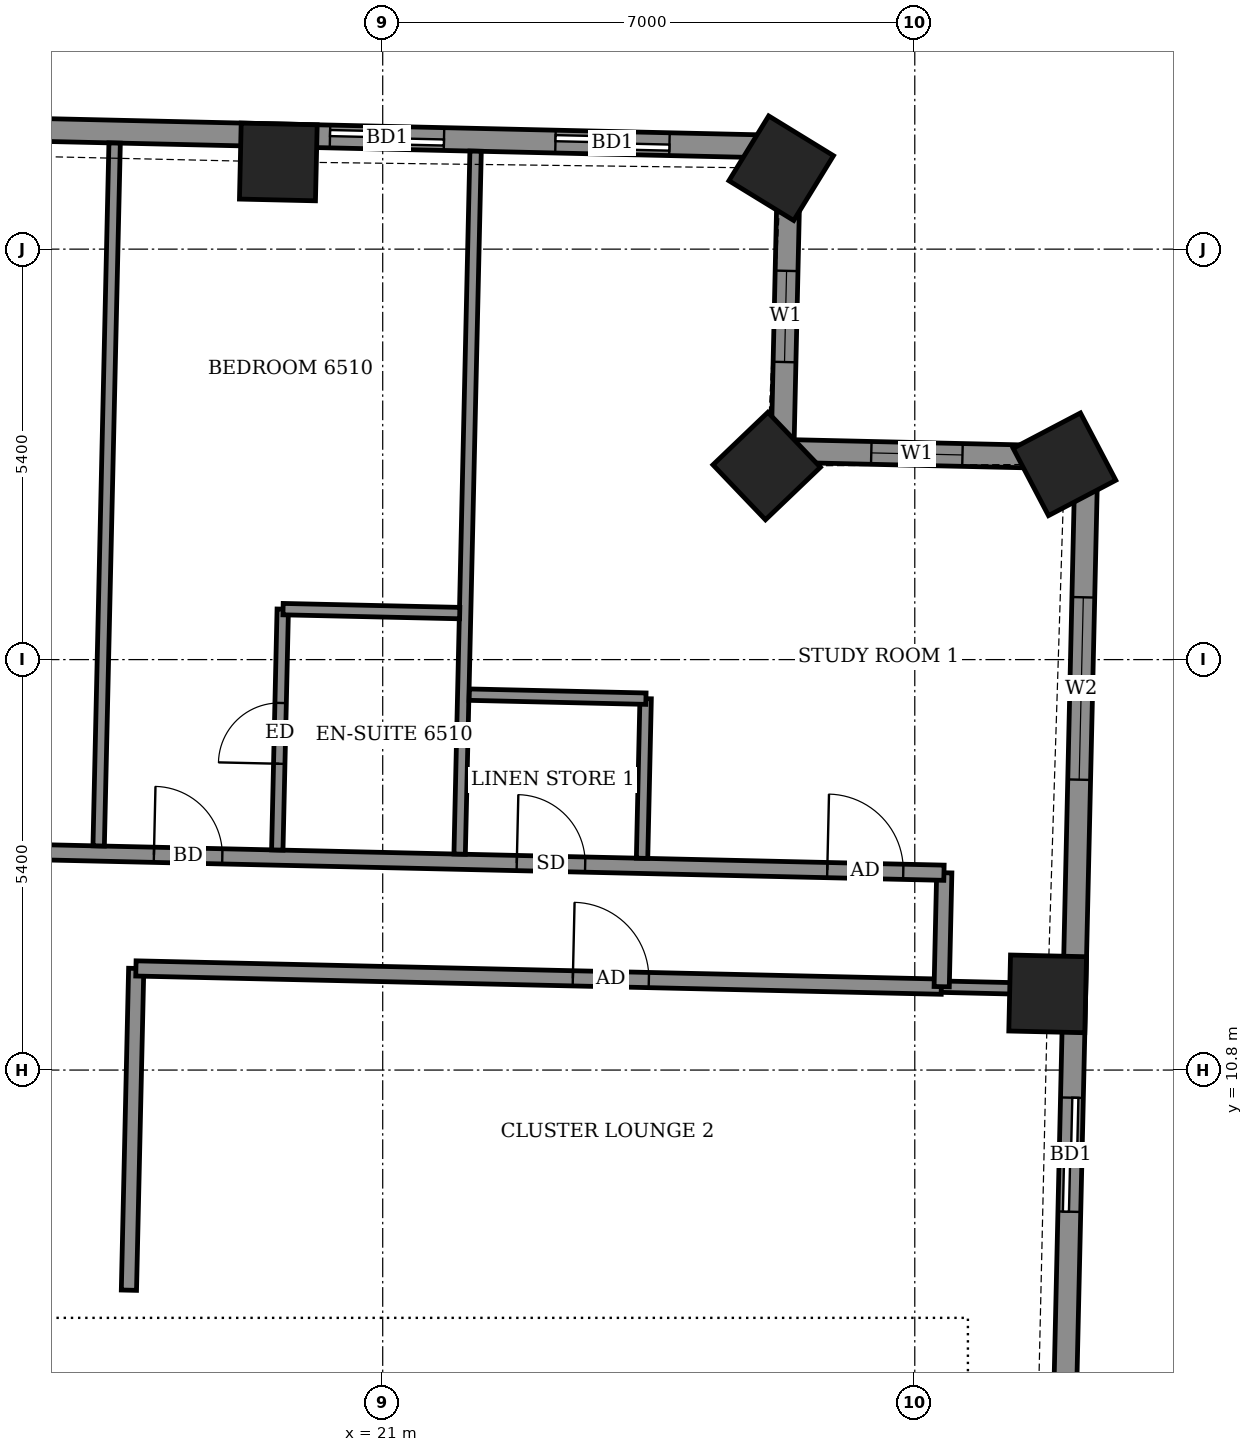
"""IFC4 building model, lengths in metres.
Left out: names, types, materials, properties, quantities, classifications, styles, units other than length and angle.
Written with IfcOpenShell. Run it as: python <this file> out.ifc"""

import sys

from ifc_helpers import new_model, si_unit, direction, frame, frame_2d, origin, origin_2d, place, context, subcontext, project, spatial, rectangle, extrude, element, fill, save


model = new_model("IFC4")
c1 = context("Model", 3, precision=1e-05, world=origin(), true_north=direction((0.0, 1.0)))
c2 = subcontext(c1, "Body", "Model", "MODEL_VIEW")
j1 = project(units=[si_unit("LENGTHUNIT", "METRE"), si_unit("PLANEANGLEUNIT", "RADIAN")], contexts=[c1])
p1 = place(None, origin())
s1 = spatial("IfcSite", under=j1, at=p1, CompositionType="ELEMENT")
p2 = place(p1, origin())
s2 = spatial("IfcBuilding", under=s1, at=p2, CompositionType="ELEMENT")
p3 = place(p2, frame((0.0, 0.0, 257.3)))
s3 = spatial("IfcBuildingStorey", under=s2, at=p3, CompositionType="ELEMENT", Elevation=257.3)
for number, where, z_axis, x_axis in (
    (1, (29.748, 11.802, -0.55), (0.0, 0.0, 1.0), (0.023, 1.0, 0.0)),
    (2, (29.969, 18.77, -0.55), (0.0, 0.0, 1.0), (-0.465, 0.885, 0.0)),
    (3, (26.052, 18.747, -0.55), (0.0, 0.0, 1.0), (-0.691, 0.723, 0.0)),
    (4, (26.243, 22.665, -0.55), (0.0, 0.0, 1.0), (-0.852, 0.523, 0.0)),
    (5, (19.627, 22.747, -0.55), (0.0, 0.0, 1.0), (-1.0, 0.023, 0.0)),
):
    element("IfcColumn", number, at=place(p3, frame(where, z_axis=z_axis, x_axis=x_axis)), inside=s3, PredefinedType="COLUMN", context=c2, shape_type="SweptSolid", body=[
        extrude(rectangle(XDim=1.0, YDim=1.0, at=origin_2d()), origin(), (0.0, 0.0, 1.0), 3.6),
    ])
p4 = place(p3, frame((29.923, 4.085, 0.0), z_axis=(0.0, 0.0, 1.0), x_axis=(0.022738672774, 0.999741442954, 0.0)))
e6 = element("IfcWall", 6, at=p4, inside=s3, PredefinedType="SOLIDWALL", context=c2, shape_type="SweptSolid", body=[
    extrude(rectangle(XDim=14.774, YDim=0.3, at=frame_2d((7.387, 0.0))), origin(), (0.0, 0.0, 1.0), 2.55),
])
p5 = place(p4, frame((4.853, 0.0, 0.0)))
e7 = element("IfcOpeningElement", 7, at=p5, cuts=e6, PredefinedType="OPENING", context=c2, shape_type="SweptSolid", body=[
    extrude(rectangle(XDim=1.5, YDim=2.4, at=frame_2d((0.75, 1.2))), frame((0.0, 0.16, 0.0), z_axis=(0.0, -1.0, 0.0), x_axis=(1.0, 0.0, 0.0)), (0.0, 0.0, 1.0), 0.32),
])
p6 = place(p4, frame((10.538, 0.0, 0.9)))
e8 = element("IfcOpeningElement", 8, at=p6, cuts=e6, PredefinedType="OPENING", context=c2, shape_type="SweptSolid", body=[
    extrude(rectangle(XDim=2.4, YDim=1.5, at=frame_2d((1.2, 0.75))), frame((0.0, 0.16, 0.0), z_axis=(0.0, -1.0, 0.0), x_axis=(1.0, 0.0, 0.0)), (0.0, 0.0, 1.0), 0.32),
])
p7 = place(p3, frame((30.259, 18.855, 0.0), z_axis=(0.0, 0.0, 1.0), x_axis=(-0.999740826251, 0.022765770952, 0.0)))
e9 = element("IfcWall", 9, at=p7, inside=s3, PredefinedType="SOLIDWALL", context=c2, shape_type="SweptSolid", body=[
    extrude(rectangle(XDim=4.0, YDim=0.3, at=frame_2d((2.0, 0.0))), origin(), (0.0, 0.0, 1.0), 2.55),
])
p8 = place(p7, frame((1.632, 0.0, 0.9)))
e10 = element("IfcOpeningElement", 10, at=p8, cuts=e9, PredefinedType="OPENING", context=c2, shape_type="SweptSolid", body=[
    extrude(rectangle(XDim=1.2, YDim=1.5, at=frame_2d((0.6, 0.75))), frame((0.0, 0.16, 0.0), z_axis=(0.0, -1.0, 0.0), x_axis=(1.0, 0.0, 0.0)), (0.0, 0.0, 1.0), 0.32),
])
p9 = place(p3, frame((26.26, 18.946, 0.0), z_axis=(0.0, 0.0, 1.0), x_axis=(0.022521758502, 0.999746353029, 0.0)))
e11 = element("IfcWall", 11, at=p9, inside=s3, PredefinedType="SOLIDWALL", context=c2, shape_type="SweptSolid", body=[
    extrude(rectangle(XDim=4.0, YDim=0.3, at=frame_2d((2.0, 0.0))), origin(), (0.0, 0.0, 1.0), 2.55),
])
p10 = place(p9, frame((1.169, 0.0, 0.9)))
e12 = element("IfcOpeningElement", 12, at=p10, cuts=e11, PredefinedType="OPENING", context=c2, shape_type="SweptSolid", body=[
    extrude(rectangle(XDim=1.2, YDim=1.5, at=frame_2d((0.6, 0.75))), frame((0.0, 0.16, 0.0), z_axis=(0.0, -1.0, 0.0), x_axis=(1.0, 0.0, 0.0)), (0.0, 0.0, 1.0), 0.32),
])
p11 = place(p3, frame((26.35, 22.945, 0.0), z_axis=(0.0, 0.0, 1.0), x_axis=(-0.999742523712, 0.022691105788, 0.0)))
e13 = element("IfcWall", 13, at=p11, inside=s3, PredefinedType="SOLIDWALL", context=c2, shape_type="SweptSolid", body=[
    extrude(rectangle(XDim=47.771, YDim=0.3, at=frame_2d((23.886, 0.0))), origin(), (0.0, 0.0, 1.0), 2.55),
])
p12 = place(p11, frame((1.578, 0.0, 0.0)))
e14 = element("IfcOpeningElement", 14, at=p12, cuts=e13, PredefinedType="OPENING", context=c2, shape_type="SweptSolid", body=[
    extrude(rectangle(XDim=1.5, YDim=2.4, at=frame_2d((0.75, 1.2))), frame((0.0, 0.16, 0.0), z_axis=(0.0, -1.0, 0.0), x_axis=(1.0, 0.0, 0.0)), (0.0, 0.0, 1.0), 0.32),
])
p13 = place(p11, frame((4.545, 0.0, 0.0)))
e15 = element("IfcOpeningElement", 15, at=p13, cuts=e13, PredefinedType="OPENING", context=c2, shape_type="SweptSolid", body=[
    extrude(rectangle(XDim=1.5, YDim=2.4, at=frame_2d((0.75, 1.2))), frame((0.0, 0.16, 0.0), z_axis=(0.0, -1.0, 0.0), x_axis=(1.0, 0.0, 0.0)), (0.0, 0.0, 1.0), 0.32),
])
p14 = place(p11, frame((10.354, 0.0, 0.0)))
e16 = element("IfcOpeningElement", 16, at=p14, cuts=e13, PredefinedType="OPENING", context=c2, shape_type="SweptSolid", body=[
    extrude(rectangle(XDim=1.5, YDim=2.4, at=frame_2d((0.75, 1.2))), frame((0.0, 0.16, 0.0), z_axis=(0.0, -1.0, 0.0), x_axis=(1.0, 0.0, 0.0)), (0.0, 0.0, 1.0), 0.32),
])
p15 = place(p11, frame((15.204, 0.0, 0.0)))
e17 = element("IfcOpeningElement", 17, at=p15, cuts=e13, PredefinedType="OPENING", context=c2, shape_type="SweptSolid", body=[
    extrude(rectangle(XDim=1.5, YDim=2.4, at=frame_2d((0.75, 1.2))), frame((0.0, 0.16, 0.0), z_axis=(0.0, -1.0, 0.0), x_axis=(1.0, 0.0, 0.0)), (0.0, 0.0, 1.0), 0.32),
])
p16 = place(p11, frame((18.537, 0.0, 0.0)))
e18 = element("IfcOpeningElement", 18, at=p16, cuts=e13, PredefinedType="OPENING", context=c2, shape_type="SweptSolid", body=[
    extrude(rectangle(XDim=1.2, YDim=2.4, at=frame_2d((0.6, 1.2))), frame((0.0, 0.16, 0.0), z_axis=(0.0, -1.0, 0.0), x_axis=(1.0, 0.0, 0.0)), (0.0, 0.0, 1.0), 0.32),
])
p17 = place(p11, frame((24.171, 0.0, 0.0)))
e19 = element("IfcOpeningElement", 19, at=p17, cuts=e13, PredefinedType="OPENING", context=c2, shape_type="SweptSolid", body=[
    extrude(rectangle(XDim=1.5, YDim=2.4, at=frame_2d((0.75, 1.2))), frame((0.0, 0.16, 0.0), z_axis=(0.0, -1.0, 0.0), x_axis=(1.0, 0.0, 0.0)), (0.0, 0.0, 1.0), 0.32),
])
p18 = place(p11, frame((28.871, 0.0, 0.0)))
e20 = element("IfcOpeningElement", 20, at=p18, cuts=e13, PredefinedType="OPENING", context=c2, shape_type="SweptSolid", body=[
    extrude(rectangle(XDim=1.5, YDim=2.4, at=frame_2d((0.75, 1.2))), frame((0.0, 0.16, 0.0), z_axis=(0.0, -1.0, 0.0), x_axis=(1.0, 0.0, 0.0)), (0.0, 0.0, 1.0), 0.32),
])
p19 = place(p11, frame((32.055, 0.0, 0.0)))
e21 = element("IfcOpeningElement", 21, at=p19, cuts=e13, PredefinedType="OPENING", context=c2, shape_type="SweptSolid", body=[
    extrude(rectangle(XDim=1.5, YDim=2.4, at=frame_2d((0.75, 1.2))), frame((0.0, 0.16, 0.0), z_axis=(0.0, -1.0, 0.0), x_axis=(1.0, 0.0, 0.0)), (0.0, 0.0, 1.0), 0.32),
])
p20 = place(p11, frame((37.813, 0.0, 0.0)))
e22 = element("IfcOpeningElement", 22, at=p20, cuts=e13, PredefinedType="OPENING", context=c2, shape_type="SweptSolid", body=[
    extrude(rectangle(XDim=1.5, YDim=2.4, at=frame_2d((0.75, 1.2))), frame((0.0, 0.16, 0.0), z_axis=(0.0, -1.0, 0.0), x_axis=(1.0, 0.0, 0.0)), (0.0, 0.0, 1.0), 0.32),
])
p21 = place(p11, frame((43.052, 0.0, 0.9)))
e23 = element("IfcOpeningElement", 23, at=p21, cuts=e13, PredefinedType="OPENING", context=c2, shape_type="SweptSolid", body=[
    extrude(rectangle(XDim=2.4, YDim=1.5, at=frame_2d((1.2, 0.75))), frame((0.0, 0.16, 0.0), z_axis=(0.0, -1.0, 0.0), x_axis=(1.0, 0.0, 0.0)), (0.0, 0.0, 1.0), 0.32),
])
p22 = place(p3, frame((17.661, 7.904, 0.0), z_axis=(0.0, 0.0, 1.0), x_axis=(0.022718785711, 0.999741895079, 0.0)))
e24 = element("IfcWall", 24, at=p22, inside=s3, PredefinedType="PARTITIONING", context=c2, shape_type="SweptSolid", body=[
    extrude(rectangle(XDim=4.234, YDim=0.2, at=frame_2d((2.117, 0.0))), origin(), (0.0, 0.0, 1.0), 3.05),
])
p23 = place(p3, frame((17.753, 12.137, 0.0), z_axis=(0.0, 0.0, 1.0), x_axis=(0.999743663474, -0.022640833553, 0.0)))
e25 = element("IfcWall", 25, at=p23, inside=s3, PredefinedType="PARTITIONING", context=c2, shape_type="SweptSolid", body=[
    extrude(rectangle(XDim=10.6, YDim=0.2, at=frame_2d((5.3, 0.0))), origin(), (0.0, 0.0, 1.0), 3.05),
])
p24 = place(p23, frame((5.75, 0.0, 0.0)))
e26 = element("IfcOpeningElement", 26, at=p24, cuts=e25, PredefinedType="OPENING", context=c2, shape_type="SweptSolid", body=[
    extrude(rectangle(XDim=1.0, YDim=2.1, at=frame_2d((0.5, 1.05))), frame((0.0, 0.11, 0.0), z_axis=(0.0, -1.0, 0.0), x_axis=(1.0, 0.0, 0.0)), (0.0, 0.0, 1.0), 0.22),
])
p25 = place(p3, frame((28.35, 11.897, 0.0), z_axis=(0.0, 0.0, 1.0), x_axis=(0.999734618493, -0.023036765969, 0.0)))
e27 = element("IfcWall", 27, at=p25, inside=s3, PredefinedType="PARTITIONING", context=c2, shape_type="SweptSolid", body=[
    extrude(rectangle(XDim=1.6, YDim=0.15, at=frame_2d((0.8, 0.0))), origin(), (0.0, 0.0, 1.0), 3.05),
])
p26 = place(p3, frame((28.354, 11.897, 0.0), z_axis=(0.0, 0.0, 1.0), x_axis=(0.022632637625, 0.99974384905, 0.0)))
e28 = element("IfcWall", 28, at=p26, inside=s3, PredefinedType="PARTITIONING", context=c2, shape_type="SweptSolid", body=[
    extrude(rectangle(XDim=1.5, YDim=0.2, at=frame_2d((0.75, 0.0))), origin(), (0.0, 0.0, 1.0), 3.05),
])
p27 = place(p3, frame((-24.474, 14.596, 0.0), z_axis=(0.0, 0.0, 1.0), x_axis=(0.999742424031, -0.022695497208, 0.0)))
e29 = element("IfcWall", 29, at=p27, inside=s3, PredefinedType="PARTITIONING", context=c2, shape_type="SweptSolid", body=[
    extrude(rectangle(XDim=52.872, YDim=0.2, at=frame_2d((26.436, 0.0))), origin(), (0.0, 0.0, 1.0), 3.05),
])
p28 = place(p27, frame((51.336, 0.0, 0.0)))
e30 = element("IfcOpeningElement", 30, at=p28, cuts=e29, PredefinedType="OPENING", context=c2, shape_type="SweptSolid", body=[
    extrude(rectangle(XDim=1.0, YDim=2.1, at=frame_2d((0.5, 1.05))), frame((0.0, 0.11, 0.0), z_axis=(0.0, -1.0, 0.0), x_axis=(1.0, 0.0, 0.0)), (0.0, 0.0, 1.0), 0.22),
])
p29 = place(p27, frame((47.25, 0.0, 0.0)))
e31 = element("IfcOpeningElement", 31, at=p29, cuts=e29, PredefinedType="OPENING", context=c2, shape_type="SweptSolid", body=[
    extrude(rectangle(XDim=0.9, YDim=2.1, at=frame_2d((0.45, 1.05))), frame((0.0, 0.11, 0.0), z_axis=(0.0, -1.0, 0.0), x_axis=(1.0, 0.0, 0.0)), (0.0, 0.0, 1.0), 0.22),
])
p30 = place(p27, frame((42.475, 0.0, 0.0)))
e32 = element("IfcOpeningElement", 32, at=p30, cuts=e29, PredefinedType="OPENING", context=c2, shape_type="SweptSolid", body=[
    extrude(rectangle(XDim=0.9, YDim=2.1, at=frame_2d((0.45, 1.05))), frame((0.0, 0.11, 0.0), z_axis=(0.0, -1.0, 0.0), x_axis=(1.0, 0.0, 0.0)), (0.0, 0.0, 1.0), 0.22),
])
p31 = place(p27, frame((40.15, 0.0, 0.0)))
e33 = element("IfcOpeningElement", 33, at=p31, cuts=e29, PredefinedType="OPENING", context=c2, shape_type="SweptSolid", body=[
    extrude(rectangle(XDim=0.9, YDim=2.1, at=frame_2d((0.45, 1.05))), frame((0.0, 0.11, 0.0), z_axis=(0.0, -1.0, 0.0), x_axis=(1.0, 0.0, 0.0)), (0.0, 0.0, 1.0), 0.22),
])
p32 = place(p27, frame((33.15, 0.0, 0.0)))
e34 = element("IfcOpeningElement", 34, at=p32, cuts=e29, PredefinedType="OPENING", context=c2, shape_type="SweptSolid", body=[
    extrude(rectangle(XDim=0.9, YDim=2.1, at=frame_2d((0.45, 1.05))), frame((0.0, 0.11, 0.0), z_axis=(0.0, -1.0, 0.0), x_axis=(1.0, 0.0, 0.0)), (0.0, 0.0, 1.0), 0.22),
])
p33 = place(p27, frame((30.95, 0.0, 0.0)))
e35 = element("IfcOpeningElement", 35, at=p33, cuts=e29, PredefinedType="OPENING", context=c2, shape_type="SweptSolid", body=[
    extrude(rectangle(XDim=0.9, YDim=2.1, at=frame_2d((0.45, 1.05))), frame((0.0, 0.11, 0.0), z_axis=(0.0, -1.0, 0.0), x_axis=(1.0, 0.0, 0.0)), (0.0, 0.0, 1.0), 0.22),
])
p34 = place(p27, frame((23.975, 0.0, 0.0)))
e36 = element("IfcOpeningElement", 36, at=p34, cuts=e29, PredefinedType="OPENING", context=c2, shape_type="SweptSolid", body=[
    extrude(rectangle(XDim=0.9, YDim=2.1, at=frame_2d((0.45, 1.05))), frame((0.0, 0.11, 0.0), z_axis=(0.0, -1.0, 0.0), x_axis=(1.0, 0.0, 0.0)), (0.0, 0.0, 1.0), 0.22),
])
p35 = place(p27, frame((21.925, 0.0, 0.0)))
e37 = element("IfcOpeningElement", 37, at=p35, cuts=e29, PredefinedType="OPENING", context=c2, shape_type="SweptSolid", body=[
    extrude(rectangle(XDim=0.9, YDim=2.1, at=frame_2d((0.45, 1.05))), frame((0.0, 0.11, 0.0), z_axis=(0.0, -1.0, 0.0), x_axis=(1.0, 0.0, 0.0)), (0.0, 0.0, 1.0), 0.22),
])
p36 = place(p27, frame((14.975, 0.0, 0.0)))
e38 = element("IfcOpeningElement", 38, at=p36, cuts=e29, PredefinedType="OPENING", context=c2, shape_type="SweptSolid", body=[
    extrude(rectangle(XDim=0.9, YDim=2.1, at=frame_2d((0.45, 1.05))), frame((0.0, 0.11, 0.0), z_axis=(0.0, -1.0, 0.0), x_axis=(1.0, 0.0, 0.0)), (0.0, 0.0, 1.0), 0.22),
])
p37 = place(p27, frame((12.65, 0.0, 0.0)))
e39 = element("IfcOpeningElement", 39, at=p37, cuts=e29, PredefinedType="OPENING", context=c2, shape_type="SweptSolid", body=[
    extrude(rectangle(XDim=0.9, YDim=2.1, at=frame_2d((0.45, 1.05))), frame((0.0, 0.11, 0.0), z_axis=(0.0, -1.0, 0.0), x_axis=(1.0, 0.0, 0.0)), (0.0, 0.0, 1.0), 0.22),
])
p38 = place(p27, frame((2.0, 0.0, 0.0)))
e40 = element("IfcOpeningElement", 40, at=p38, cuts=e29, PredefinedType="OPENING", context=c2, shape_type="SweptSolid", body=[
    extrude(rectangle(XDim=1.0, YDim=2.1, at=frame_2d((0.5, 1.05))), frame((0.0, 0.11, 0.0), z_axis=(0.0, -1.0, 0.0), x_axis=(1.0, 0.0, 0.0)), (0.0, 0.0, 1.0), 0.22),
])
p39 = place(p27, frame((7.75, 0.0, 0.0)))
e41 = element("IfcOpeningElement", 41, at=p39, cuts=e29, PredefinedType="OPENING", context=c2, shape_type="SweptSolid", body=[
    extrude(rectangle(XDim=0.9, YDim=2.1, at=frame_2d((0.45, 1.05))), frame((0.0, 0.11, 0.0), z_axis=(0.0, -1.0, 0.0), x_axis=(1.0, 0.0, 0.0)), (0.0, 0.0, 1.0), 0.22),
])
p40 = place(p3, frame((17.263, 13.749, 0.0), z_axis=(0.0, 0.0, 1.0), x_axis=(0.022699820474, 0.999742325877, 0.0)))
e42 = element("IfcWall", 42, at=p40, inside=s3, PredefinedType="PARTITIONING", context=c2, shape_type="SweptSolid", body=[
    extrude(rectangle(XDim=9.25, YDim=0.15, at=frame_2d((4.625, 0.0))), origin(), (0.0, 0.0, 1.0), 2.55),
])
p41 = place(p3, frame((19.613, 13.695, 0.0), z_axis=(0.0, 0.0, 1.0), x_axis=(0.022721405353, 0.999741835545, 0.0)))
e43 = element("IfcWall", 43, at=p41, inside=s3, PredefinedType="PARTITIONING", context=c2, shape_type="SweptSolid", body=[
    extrude(rectangle(XDim=3.17, YDim=0.15, at=frame_2d((1.585, 0.0))), origin(), (0.0, 0.0, 1.0), 3.05),
])
p42 = place(p41, frame((1.135, 0.0, 0.0)))
e44 = element("IfcOpeningElement", 44, at=p42, cuts=e43, PredefinedType="OPENING", context=c2, shape_type="SweptSolid", body=[
    extrude(rectangle(XDim=0.8, YDim=2.1, at=frame_2d((0.4, 1.05))), frame((0.0, 0.085, 0.0), z_axis=(0.0, -1.0, 0.0), x_axis=(1.0, 0.0, 0.0)), (0.0, 0.0, 1.0), 0.17),
])
p43 = place(p3, frame((22.012, 13.641, 0.0), z_axis=(0.0, 0.0, 1.0), x_axis=(0.022698023584, 0.999742366675, 0.0)))
e45 = element("IfcWall", 45, at=p43, inside=s3, PredefinedType="PARTITIONING", context=c2, shape_type="SweptSolid", body=[
    extrude(rectangle(XDim=9.25, YDim=0.15, at=frame_2d((4.625, 0.0))), origin(), (0.0, 0.0, 1.0), 2.55),
])
p44 = place(p3, frame((24.412, 13.586, 0.0), z_axis=(0.0, 0.0, 1.0), x_axis=(0.022314832676, 0.999750993119, 0.0)))
e46 = element("IfcWall", 46, at=p44, inside=s3, PredefinedType="PARTITIONING", context=c2, shape_type="SweptSolid", body=[
    extrude(rectangle(XDim=2.101, YDim=0.15, at=frame_2d((1.05, 0.0))), origin(), (0.0, 0.0, 1.0), 3.05),
])
for number, where, z_axis, x_axis in (
    (47, (22.139, 15.739, 0.0), (0.0, 0.0, 1.0), (1.0, -0.023, 0.0)),
    (48, (19.689, 16.864, 0.0), (0.0, 0.0, 1.0), (1.0, -0.022, 0.0)),
):
    element("IfcWall", number, at=place(p3, frame(where, z_axis=z_axis, x_axis=x_axis)), inside=s3, PredefinedType="PARTITIONING", context=c2, shape_type="SweptSolid", body=[
        extrude(rectangle(XDim=2.324, YDim=0.15, at=frame_2d((1.162, 0.0))), origin(), (0.0, 0.0, 1.0), 3.05),
    ])
p45 = place(p5, origin())
e49 = element("IfcDoor", 49, at=p45, inside=s3, OperationType="SLIDING_TO_LEFT", PredefinedType="DOOR", context=c2, shape_type="SweptSolid", body=[
    extrude(rectangle(XDim=1.5, YDim=2.4, at=frame_2d((0.75, 1.2))), frame((0.0, 0.025, 0.0), z_axis=(0.0, -1.0, 0.0), x_axis=(1.0, 0.0, 0.0)), (0.0, 0.0, 1.0), 0.05),
])
fill(e7, e49)
p46 = place(p6, origin())
e50 = element("IfcWindow", 50, at=p46, inside=s3, PartitioningType="DOUBLE_PANEL_VERTICAL", PredefinedType="WINDOW", context=c2, shape_type="SweptSolid", body=[
    extrude(rectangle(XDim=2.4, YDim=1.5, at=frame_2d((1.2, 0.75))), frame((0.0, 0.03, 0.0), z_axis=(0.0, -1.0, 0.0), x_axis=(1.0, 0.0, 0.0)), (0.0, 0.0, 1.0), 0.06),
])
fill(e8, e50)
p47 = place(p8, origin())
e51 = element("IfcWindow", 51, at=p47, inside=s3, PartitioningType="SINGLE_PANEL", PredefinedType="WINDOW", context=c2, shape_type="SweptSolid", body=[
    extrude(rectangle(XDim=1.2, YDim=1.5, at=frame_2d((0.6, 0.75))), frame((0.0, 0.03, 0.0), z_axis=(0.0, -1.0, 0.0), x_axis=(1.0, 0.0, 0.0)), (0.0, 0.0, 1.0), 0.06),
])
fill(e10, e51)
p48 = place(p10, origin())
e52 = element("IfcWindow", 52, at=p48, inside=s3, PartitioningType="SINGLE_PANEL", PredefinedType="WINDOW", context=c2, shape_type="SweptSolid", body=[
    extrude(rectangle(XDim=1.2, YDim=1.5, at=frame_2d((0.6, 0.75))), frame((0.0, 0.03, 0.0), z_axis=(0.0, -1.0, 0.0), x_axis=(1.0, 0.0, 0.0)), (0.0, 0.0, 1.0), 0.06),
])
fill(e12, e52)
p49 = place(p12, origin())
e53 = element("IfcDoor", 53, at=p49, inside=s3, OperationType="SLIDING_TO_LEFT", PredefinedType="DOOR", context=c2, shape_type="SweptSolid", body=[
    extrude(rectangle(XDim=1.5, YDim=2.4, at=frame_2d((0.75, 1.2))), frame((0.0, 0.025, 0.0), z_axis=(0.0, -1.0, 0.0), x_axis=(1.0, 0.0, 0.0)), (0.0, 0.0, 1.0), 0.05),
])
fill(e14, e53)
p50 = place(p13, origin())
e54 = element("IfcDoor", 54, at=p50, inside=s3, OperationType="SLIDING_TO_LEFT", PredefinedType="DOOR", context=c2, shape_type="SweptSolid", body=[
    extrude(rectangle(XDim=1.5, YDim=2.4, at=frame_2d((0.75, 1.2))), frame((0.0, 0.025, 0.0), z_axis=(0.0, -1.0, 0.0), x_axis=(1.0, 0.0, 0.0)), (0.0, 0.0, 1.0), 0.05),
])
fill(e15, e54)
p51 = place(p24, origin())
e55 = element("IfcDoor", 55, at=p51, inside=s3, OperationType="SINGLE_SWING_RIGHT", PredefinedType="DOOR", context=c2, shape_type="SweptSolid", body=[
    extrude(rectangle(XDim=1.0, YDim=2.1, at=frame_2d((0.5, 1.05))), frame((0.0, 0.025, 0.0), z_axis=(0.0, -1.0, 0.0), x_axis=(1.0, 0.0, 0.0)), (0.0, 0.0, 1.0), 0.05),
])
fill(e26, e55)
p52 = place(p28, origin())
e56 = element("IfcDoor", 56, at=p52, inside=s3, OperationType="SINGLE_SWING_LEFT", PredefinedType="DOOR", context=c2, shape_type="SweptSolid", body=[
    extrude(rectangle(XDim=1.0, YDim=2.1, at=frame_2d((0.5, 1.05))), frame((0.0, 0.025, 0.0), z_axis=(0.0, -1.0, 0.0), x_axis=(1.0, 0.0, 0.0)), (0.0, 0.0, 1.0), 0.05),
])
fill(e30, e56)
p53 = place(p29, origin())
e57 = element("IfcDoor", 57, at=p53, inside=s3, OperationType="SINGLE_SWING_LEFT", PredefinedType="DOOR", context=c2, shape_type="SweptSolid", body=[
    extrude(rectangle(XDim=0.9, YDim=2.1, at=frame_2d((0.45, 1.05))), frame((0.0, 0.025, 0.0), z_axis=(0.0, -1.0, 0.0), x_axis=(1.0, 0.0, 0.0)), (0.0, 0.0, 1.0), 0.05),
])
fill(e31, e57)
p54 = place(p30, origin())
e58 = element("IfcDoor", 58, at=p54, inside=s3, OperationType="SINGLE_SWING_RIGHT", PredefinedType="DOOR", context=c2, shape_type="SweptSolid", body=[
    extrude(rectangle(XDim=0.9, YDim=2.1, at=frame_2d((0.45, 1.05))), frame((0.0, 0.025, 0.0), z_axis=(0.0, -1.0, 0.0), x_axis=(1.0, 0.0, 0.0)), (0.0, 0.0, 1.0), 0.05),
])
fill(e32, e58)
p55 = place(p42, origin())
e59 = element("IfcDoor", 59, at=p55, inside=s3, OperationType="SINGLE_SWING_RIGHT", PredefinedType="DOOR", context=c2, shape_type="SweptSolid", body=[
    extrude(rectangle(XDim=0.8, YDim=2.1, at=frame_2d((0.4, 1.05))), frame((0.0, 0.025, 0.0), z_axis=(0.0, -1.0, 0.0), x_axis=(1.0, 0.0, 0.0)), (0.0, 0.0, 1.0), 0.05),
])
fill(e44, e59)
save(model, sys.argv[1])
